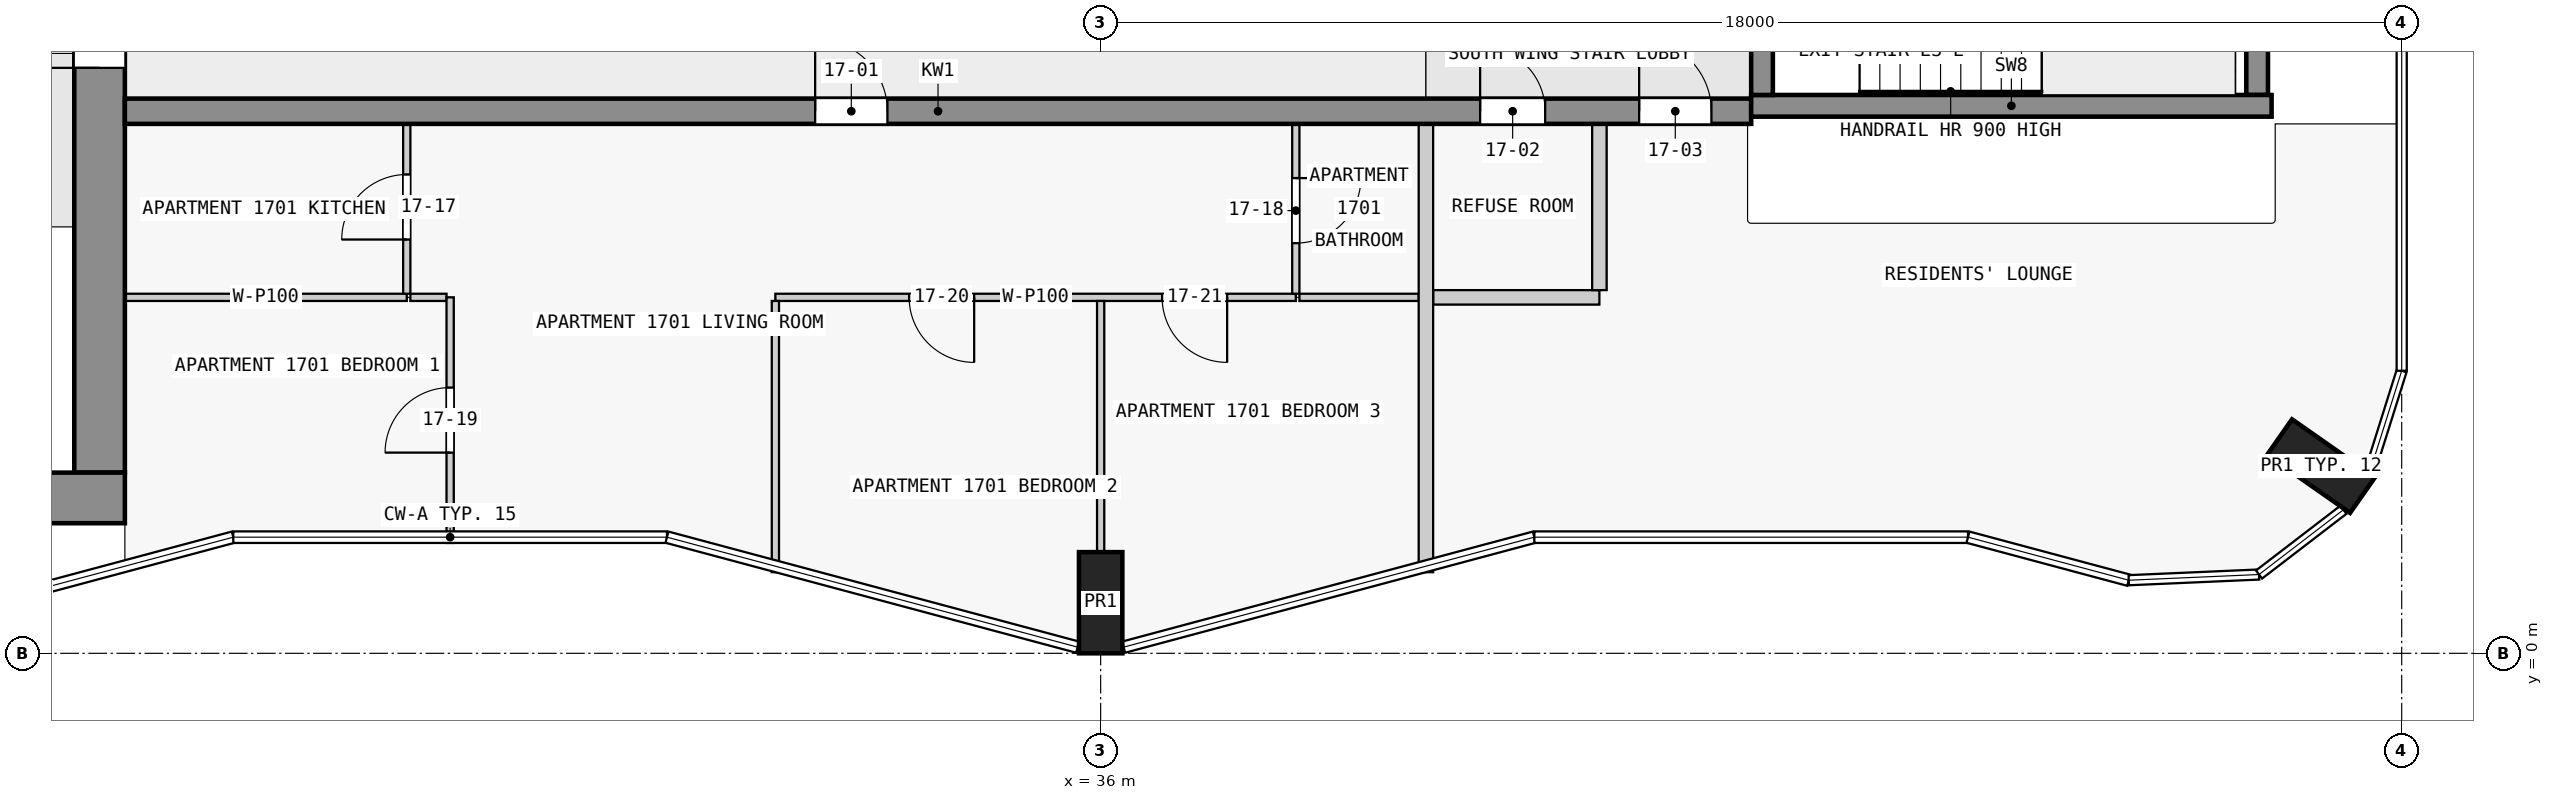
"""IFC4 building model, lengths in metres.
Left out: names, types, materials, properties, quantities, classifications, styles, units other than length and angle.
Written with IfcOpenShell. Run it as: python <this file> out.ifc"""

import sys

from ifc_helpers import new_model, si_unit, direction, frame, frame_2d, origin, origin_2d, place, context, subcontext, project, spatial, rectangle, extrude, element, fill, save


model = new_model("IFC4")
c1 = context("Model", 3, precision=1e-05, world=origin(), true_north=direction((0.0, 1.0)))
c2 = subcontext(c1, "Body", "Model", "MODEL_VIEW")
j1 = project(units=[si_unit("LENGTHUNIT", "METRE"), si_unit("PLANEANGLEUNIT", "RADIAN")], contexts=[c1])
p1 = place(None, origin())
s1 = spatial("IfcSite", under=j1, at=p1, CompositionType="ELEMENT")
p2 = place(p1, origin())
s2 = spatial("IfcBuilding", under=s1, at=p2, CompositionType="ELEMENT")
p3 = place(p2, frame((0.0, 0.0, 68.8)))
s3 = spatial("IfcBuildingStorey", under=s2, at=p3, CompositionType="ELEMENT", Elevation=68.8)
for number, where, z_axis, x_axis in (
    (1, (36.0, 0.7, 0.0), (0.0, 0.0, 1.0), (1.0, 0.0, 0.0)),
    (2, (52.884, 2.59, 0.0), (0.0, 0.0, 1.0), (0.574, 0.819, 0.0)),
):
    element("IfcColumn", number, at=place(p3, frame(where, z_axis=z_axis, x_axis=x_axis)), inside=s3, PredefinedType="COLUMN", context=c2, shape_type="SweptSolid", body=[
        extrude(rectangle(XDim=0.6, YDim=1.4, at=origin_2d()), origin(), (0.0, 0.0, 1.0), 3.5),
    ])
p4 = place(p3, frame((1.6, 2.15, 0.0), z_axis=(0.0, 0.0, 1.0), x_axis=(1.0, 0.0, 0.0)))
e3 = element("IfcWall", 3, at=p4, inside=s3, PredefinedType="SHEAR", context=c2, shape_type="SweptSolid", body=[
    extrude(rectangle(XDim=20.9, YDim=0.7, at=frame_2d((10.45, 0.0))), origin(), (0.0, 0.0, 1.0), 3.2),
])
p5 = place(p3, frame((22.15, 2.5, 0.0), z_axis=(0.0, 0.0, 1.0), x_axis=(0.0, 1.0, 0.0)))
e4 = element("IfcWall", 4, at=p5, inside=s3, PredefinedType="SHEAR", context=c2, shape_type="SweptSolid", body=[
    extrude(rectangle(XDim=14.8, YDim=0.7, at=frame_2d((7.4, 0.0))), origin(), (0.0, 0.0, 1.0), 3.2),
])
p6 = place(p5, frame((5.6, 0.0, 0.0)))
e5 = element("IfcOpeningElement", 5, at=p6, cuts=e4, PredefinedType="OPENING", context=c2, shape_type="SweptSolid", body=[
    extrude(rectangle(XDim=1.8, YDim=2.1, at=frame_2d((0.9, 1.05))), frame((0.0, 0.36, 0.0), z_axis=(0.0, -1.0, 0.0), x_axis=(1.0, 0.0, 0.0)), (0.0, 0.0, 1.0), 0.72),
])
p7 = place(p3, frame((45.15, 7.725, 0.0), z_axis=(0.0, 0.0, 1.0), x_axis=(0.0, 1.0, 0.0)))
e6 = element("IfcWall", 6, at=p7, inside=s3, PredefinedType="SHEAR", context=c2, shape_type="SweptSolid", body=[
    extrude(rectangle(XDim=2.55, YDim=0.3, at=frame_2d((1.275, 0.0))), origin(), (0.0, 0.0, 1.0), 3.5),
])
p8 = place(p7, frame((0.725, 0.0, 0.0)))
e7 = element("IfcOpeningElement", 7, at=p8, cuts=e6, PredefinedType="OPENING", context=c2, shape_type="SweptSolid", body=[
    extrude(rectangle(XDim=1.1, YDim=2.1, at=frame_2d((0.55, 1.05))), frame((0.0, 0.16, 0.0), z_axis=(0.0, -1.0, 0.0), x_axis=(1.0, 0.0, 0.0)), (0.0, 0.0, 1.0), 0.32),
])
p9 = place(p3, frame((52.0, 7.725, 0.0), z_axis=(0.0, 0.0, 1.0), x_axis=(0.0, 1.0, 0.0)))
e8 = element("IfcWall", 8, at=p9, inside=s3, PredefinedType="SHEAR", context=c2, shape_type="SweptSolid", body=[
    extrude(rectangle(XDim=2.55, YDim=0.3, at=frame_2d((1.275, 0.0))), origin(), (0.0, 0.0, 1.0), 3.5),
])
p10 = place(p3, frame((45.0, 7.575, 0.0), z_axis=(0.0, 0.0, 1.0), x_axis=(1.0, 0.0, 0.0)))
e9 = element("IfcWall", 9, at=p10, inside=s3, PredefinedType="SHEAR", context=c2, shape_type="SweptSolid", body=[
    extrude(rectangle(XDim=7.2, YDim=0.3, at=frame_2d((3.6, 0.0))), origin(), (0.0, 0.0, 1.0), 3.5),
])
p11 = place(p3, frame((22.5, 7.5, 0.0), z_axis=(0.0, 0.0, 1.0), x_axis=(1.0, 0.0, 0.0)))
e10 = element("IfcWall", 10, at=p11, inside=s3, PredefinedType="SHEAR", context=c2, shape_type="SweptSolid", body=[
    extrude(rectangle(XDim=22.5, YDim=0.35, at=frame_2d((11.25, 0.0))), origin(), (0.0, 0.0, 1.0), 3.2),
])
p12 = place(p11, frame((9.55, 0.0, 0.0)))
e11 = element("IfcOpeningElement", 11, at=p12, cuts=e10, PredefinedType="OPENING", context=c2, shape_type="SweptSolid", body=[
    extrude(rectangle(XDim=1.0, YDim=2.1, at=frame_2d((0.5, 1.05))), frame((0.0, 0.185, 0.0), z_axis=(0.0, -1.0, 0.0), x_axis=(1.0, 0.0, 0.0)), (0.0, 0.0, 1.0), 0.37),
])
p13 = place(p11, frame((18.75, 0.0, 0.0)))
e12 = element("IfcOpeningElement", 12, at=p13, cuts=e10, PredefinedType="OPENING", context=c2, shape_type="SweptSolid", body=[
    extrude(rectangle(XDim=0.9, YDim=2.1, at=frame_2d((0.45, 1.05))), frame((0.0, 0.185, 0.0), z_axis=(0.0, -1.0, 0.0), x_axis=(1.0, 0.0, 0.0)), (0.0, 0.0, 1.0), 0.37),
])
p14 = place(p11, frame((20.95, 0.0, 0.0)))
e13 = element("IfcOpeningElement", 13, at=p14, cuts=e10, PredefinedType="OPENING", context=c2, shape_type="SweptSolid", body=[
    extrude(rectangle(XDim=1.0, YDim=2.1, at=frame_2d((0.5, 1.05))), frame((0.0, 0.185, 0.0), z_axis=(0.0, -1.0, 0.0), x_axis=(1.0, 0.0, 0.0)), (0.0, 0.0, 1.0), 0.37),
])
p15 = place(p3, frame((26.95, 4.925, 0.0), z_axis=(0.0, 0.0, 1.0), x_axis=(-1.0, 0.0, 0.0)))
e14 = element("IfcWall", 14, at=p15, inside=s3, PredefinedType="PARTITIONING", context=c2, shape_type="SweptSolid", body=[
    extrude(rectangle(XDim=0.5, YDim=0.1, at=frame_2d((0.25, 0.0))), origin(), (0.0, 0.0, 1.0), 3.2),
])
p16 = place(p3, frame((38.7, 4.925, 0.0), z_axis=(0.0, 0.0, 1.0), x_axis=(-1.0, 0.0, 0.0)))
e15 = element("IfcWall", 15, at=p16, inside=s3, PredefinedType="PARTITIONING", context=c2, shape_type="SweptSolid", body=[
    extrude(rectangle(XDim=7.2, YDim=0.1, at=frame_2d((3.6, 0.0))), origin(), (0.0, 0.0, 1.0), 3.2),
])
p17 = place(p16, frame((4.45, 0.0, 0.0)))
e16 = element("IfcOpeningElement", 16, at=p17, cuts=e15, PredefinedType="OPENING", context=c2, shape_type="SweptSolid", body=[
    extrude(rectangle(XDim=0.9, YDim=2.1, at=frame_2d((0.45, 1.05))), frame((0.0, 0.06, 0.0), z_axis=(0.0, -1.0, 0.0), x_axis=(1.0, 0.0, 0.0)), (0.0, 0.0, 1.0), 0.12),
])
p18 = place(p16, frame((0.95, 0.0, 0.0)))
e17 = element("IfcOpeningElement", 17, at=p18, cuts=e15, PredefinedType="OPENING", context=c2, shape_type="SweptSolid", body=[
    extrude(rectangle(XDim=0.9, YDim=2.1, at=frame_2d((0.45, 1.05))), frame((0.0, 0.06, 0.0), z_axis=(0.0, -1.0, 0.0), x_axis=(1.0, 0.0, 0.0)), (0.0, 0.0, 1.0), 0.12),
])
p19 = place(p3, frame((22.5, 4.925, 0.0), z_axis=(0.0, 0.0, 1.0), x_axis=(1.0, 0.0, 0.0)))
e18 = element("IfcWall", 18, at=p19, inside=s3, PredefinedType="PARTITIONING", context=c2, shape_type="SweptSolid", body=[
    extrude(rectangle(XDim=3.9, YDim=0.1, at=frame_2d((1.95, 0.0))), origin(), (0.0, 0.0, 1.0), 3.2),
])
p20 = place(p3, frame((38.75, 4.925, 0.0), z_axis=(0.0, 0.0, 1.0), x_axis=(1.0, 0.0, 0.0)))
e19 = element("IfcWall", 19, at=p20, inside=s3, PredefinedType="PARTITIONING", context=c2, shape_type="SweptSolid", body=[
    extrude(rectangle(XDim=1.65, YDim=0.1, at=frame_2d((0.825, 0.0))), origin(), (0.0, 0.0, 1.0), 3.2),
])
p21 = place(p3, frame((40.6, 4.925, 0.0), z_axis=(0.0, 0.0, 1.0), x_axis=(1.0, 0.0, 0.0)))
e20 = element("IfcWall", 20, at=p21, inside=s3, PredefinedType="PARTITIONING", context=c2, shape_type="SweptSolid", body=[
    extrude(rectangle(XDim=2.3, YDim=0.2, at=frame_2d((1.15, 0.0))), origin(), (0.0, 0.0, 1.0), 3.2),
])
p22 = place(p3, frame((26.4, 4.975, 0.0), z_axis=(0.0, 0.0, 1.0), x_axis=(0.0, 1.0, 0.0)))
e21 = element("IfcWall", 21, at=p22, inside=s3, PredefinedType="PARTITIONING", context=c2, shape_type="SweptSolid", body=[
    extrude(rectangle(XDim=2.35, YDim=0.1, at=frame_2d((1.175, 0.0))), origin(), (0.0, 0.0, 1.0), 3.2),
])
p23 = place(p22, frame((0.75, 0.0, 0.0)))
e22 = element("IfcOpeningElement", 22, at=p23, cuts=e21, PredefinedType="OPENING", context=c2, shape_type="SweptSolid", body=[
    extrude(rectangle(XDim=0.9, YDim=2.1, at=frame_2d((0.45, 1.05))), frame((0.0, 0.06, 0.0), z_axis=(0.0, -1.0, 0.0), x_axis=(1.0, 0.0, 0.0)), (0.0, 0.0, 1.0), 0.12),
])
p24 = place(p3, frame((27.0, 1.527, 0.0), z_axis=(0.0, 0.0, 1.0), x_axis=(0.0, 1.0, 0.0)))
e23 = element("IfcWall", 23, at=p24, inside=s3, PredefinedType="PARTITIONING", context=c2, shape_type="SweptSolid", body=[
    extrude(rectangle(XDim=3.398, YDim=0.1, at=frame_2d((1.699, 0.0))), origin(), (0.0, 0.0, 1.0), 3.2),
])
p25 = place(p24, frame((1.25, 0.0, 0.0)))
e24 = element("IfcOpeningElement", 24, at=p25, cuts=e23, PredefinedType="OPENING", context=c2, shape_type="SweptSolid", body=[
    extrude(rectangle(XDim=0.9, YDim=2.1, at=frame_2d((0.45, 1.05))), frame((0.0, 0.06, 0.0), z_axis=(0.0, -1.0, 0.0), x_axis=(1.0, 0.0, 0.0)), (0.0, 0.0, 1.0), 0.12),
])
p26 = place(p3, frame((31.5, 4.875, 0.0), z_axis=(0.0, 0.0, 1.0), x_axis=(0.0, -1.0, 0.0)))
e25 = element("IfcWall", 25, at=p26, inside=s3, PredefinedType="PARTITIONING", context=c2, shape_type="SweptSolid", body=[
    extrude(rectangle(XDim=3.753, YDim=0.1, at=frame_2d((1.876, 0.0))), origin(), (0.0, 0.0, 1.0), 3.2),
])
p27 = place(p3, frame((36.0, 1.4, 0.0), z_axis=(0.0, 0.0, 1.0), x_axis=(0.0, 1.0, 0.0)))
e26 = element("IfcWall", 26, at=p27, inside=s3, PredefinedType="PARTITIONING", context=c2, shape_type="SweptSolid", body=[
    extrude(rectangle(XDim=3.475, YDim=0.1, at=frame_2d((1.738, 0.0))), origin(), (0.0, 0.0, 1.0), 3.2),
])
p28 = place(p3, frame((38.7, 7.325, 0.0), z_axis=(0.0, 0.0, 1.0), x_axis=(0.0, -1.0, 0.0)))
e27 = element("IfcWall", 27, at=p28, inside=s3, PredefinedType="PARTITIONING", context=c2, shape_type="SweptSolid", body=[
    extrude(rectangle(XDim=2.35, YDim=0.1, at=frame_2d((1.175, 0.0))), origin(), (0.0, 0.0, 1.0), 3.2),
])
p29 = place(p28, frame((0.75, 0.0, 0.0)))
e28 = element("IfcOpeningElement", 28, at=p29, cuts=e27, PredefinedType="OPENING", context=c2, shape_type="SweptSolid", body=[
    extrude(rectangle(XDim=0.9, YDim=2.1, at=frame_2d((0.45, 1.05))), frame((0.0, 0.06, 0.0), z_axis=(0.0, -1.0, 0.0), x_axis=(1.0, 0.0, 0.0)), (0.0, 0.0, 1.0), 0.12),
])
p30 = place(p3, frame((40.5, 1.122, 0.0), z_axis=(0.0, 0.0, 1.0), x_axis=(0.0, 1.0, 0.0)))
e29 = element("IfcWall", 29, at=p30, inside=s3, PredefinedType="PARTITIONING", context=c2, shape_type="SweptSolid", body=[
    extrude(rectangle(XDim=6.203, YDim=0.2, at=frame_2d((3.101, 0.0))), origin(), (0.0, 0.0, 1.0), 3.2),
])
p31 = place(p3, frame((42.9, 5.025, 0.0), z_axis=(0.0, 0.0, 1.0), x_axis=(0.0, 1.0, 0.0)))
e30 = element("IfcWall", 30, at=p31, inside=s3, PredefinedType="PARTITIONING", context=c2, shape_type="SweptSolid", body=[
    extrude(rectangle(XDim=2.3, YDim=0.2, at=frame_2d((1.15, 0.0))), origin(), (0.0, 0.0, 1.0), 3.2),
])
p32 = place(p6, origin())
e31 = element("IfcDoor", 31, at=p32, inside=s3, OperationType="DOUBLE_DOOR_SINGLE_SWING", PredefinedType="DOOR", context=c2, shape_type="SweptSolid", body=[
    extrude(rectangle(XDim=1.8, YDim=2.1, at=frame_2d((0.9, 1.05))), frame((0.0, 0.025, 0.0), z_axis=(0.0, -1.0, 0.0), x_axis=(1.0, 0.0, 0.0)), (0.0, 0.0, 1.0), 0.05),
])
fill(e5, e31)
p33 = place(p12, origin())
e32 = element("IfcDoor", 32, at=p33, inside=s3, OperationType="SINGLE_SWING_LEFT", PredefinedType="DOOR", context=c2, shape_type="SweptSolid", body=[
    extrude(rectangle(XDim=1.0, YDim=2.1, at=frame_2d((0.5, 1.05))), frame((0.0, 0.025, 0.0), z_axis=(0.0, -1.0, 0.0), x_axis=(1.0, 0.0, 0.0)), (0.0, 0.0, 1.0), 0.05),
])
fill(e11, e32)
p34 = place(p13, origin())
e33 = element("IfcDoor", 33, at=p34, inside=s3, OperationType="SINGLE_SWING_RIGHT", PredefinedType="DOOR", context=c2, shape_type="SweptSolid", body=[
    extrude(rectangle(XDim=0.9, YDim=2.1, at=frame_2d((0.45, 1.05))), frame((0.0, 0.025, 0.0), z_axis=(0.0, -1.0, 0.0), x_axis=(1.0, 0.0, 0.0)), (0.0, 0.0, 1.0), 0.05),
])
fill(e12, e33)
p35 = place(p14, origin())
e34 = element("IfcDoor", 34, at=p35, inside=s3, OperationType="SINGLE_SWING_RIGHT", PredefinedType="DOOR", context=c2, shape_type="SweptSolid", body=[
    extrude(rectangle(XDim=1.0, YDim=2.1, at=frame_2d((0.5, 1.05))), frame((0.0, 0.025, 0.0), z_axis=(0.0, -1.0, 0.0), x_axis=(1.0, 0.0, 0.0)), (0.0, 0.0, 1.0), 0.05),
])
fill(e13, e34)
p36 = place(p23, origin())
e35 = element("IfcDoor", 35, at=p36, inside=s3, OperationType="SINGLE_SWING_RIGHT", PredefinedType="DOOR", context=c2, shape_type="SweptSolid", body=[
    extrude(rectangle(XDim=0.9, YDim=2.1, at=frame_2d((0.45, 1.05))), frame((0.0, 0.025, 0.0), z_axis=(0.0, -1.0, 0.0), x_axis=(1.0, 0.0, 0.0)), (0.0, 0.0, 1.0), 0.05),
])
fill(e22, e35)
p37 = place(p29, origin())
e36 = element("IfcDoor", 36, at=p37, inside=s3, OperationType="SINGLE_SWING_RIGHT", PredefinedType="DOOR", context=c2, shape_type="SweptSolid", body=[
    extrude(rectangle(XDim=0.9, YDim=2.1, at=frame_2d((0.45, 1.05))), frame((0.0, 0.025, 0.0), z_axis=(0.0, -1.0, 0.0), x_axis=(1.0, 0.0, 0.0)), (0.0, 0.0, 1.0), 0.05),
])
fill(e28, e36)
p38 = place(p25, origin())
e37 = element("IfcDoor", 37, at=p38, inside=s3, OperationType="SINGLE_SWING_RIGHT", PredefinedType="DOOR", context=c2, shape_type="SweptSolid", body=[
    extrude(rectangle(XDim=0.9, YDim=2.1, at=frame_2d((0.45, 1.05))), frame((0.0, 0.025, 0.0), z_axis=(0.0, -1.0, 0.0), x_axis=(1.0, 0.0, 0.0)), (0.0, 0.0, 1.0), 0.05),
])
fill(e24, e37)
p39 = place(p17, origin())
e38 = element("IfcDoor", 38, at=p39, inside=s3, OperationType="SINGLE_SWING_RIGHT", PredefinedType="DOOR", context=c2, shape_type="SweptSolid", body=[
    extrude(rectangle(XDim=0.9, YDim=2.1, at=frame_2d((0.45, 1.05))), frame((0.0, 0.025, 0.0), z_axis=(0.0, -1.0, 0.0), x_axis=(1.0, 0.0, 0.0)), (0.0, 0.0, 1.0), 0.05),
])
fill(e16, e38)
p40 = place(p18, origin())
e39 = element("IfcDoor", 39, at=p40, inside=s3, OperationType="SINGLE_SWING_LEFT", PredefinedType="DOOR", context=c2, shape_type="SweptSolid", body=[
    extrude(rectangle(XDim=0.9, YDim=2.1, at=frame_2d((0.45, 1.05))), frame((0.0, 0.025, 0.0), z_axis=(0.0, -1.0, 0.0), x_axis=(1.0, 0.0, 0.0)), (0.0, 0.0, 1.0), 0.05),
])
fill(e17, e39)
save(model, sys.argv[1])
